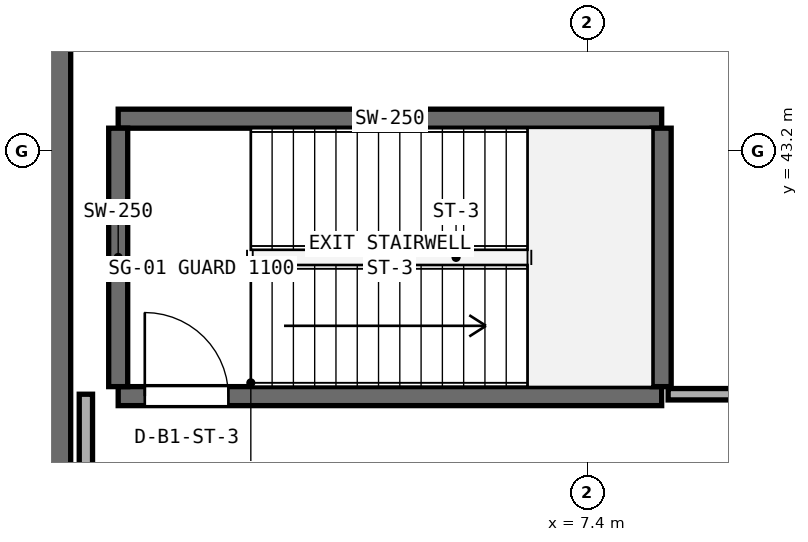
"""IFC4 building model, lengths in metres.
Left out: names, types, materials, properties, quantities, classifications, styles, units other than length and angle.
Written with IfcOpenShell. Run it as: python <this file> out.ifc"""

import sys

from ifc_helpers import new_model, si_unit, direction, frame, frame_2d, origin, place, context, subcontext, project, spatial, rectangle, extrude, element, fill, save


model = new_model("IFC4")
c1 = context("Model", 3, precision=1e-05, world=origin(), true_north=direction((0.0, 1.0)))
c2 = subcontext(c1, "Body", "Model", "MODEL_VIEW")
j1 = project(units=[si_unit("LENGTHUNIT", "METRE"), si_unit("PLANEANGLEUNIT", "RADIAN")], contexts=[c1])
p1 = place(None, origin())
s1 = spatial("IfcSite", under=j1, at=p1, CompositionType="ELEMENT")
p2 = place(p1, origin())
s2 = spatial("IfcBuilding", under=s1, at=p2, CompositionType="ELEMENT")
p3 = place(p2, frame((0.0, 0.0, -4.8)))
s3 = spatial("IfcBuildingStorey", under=s2, at=p3, CompositionType="ELEMENT", Elevation=-4.8)
p4 = place(p3, frame((0.3, 0.6, 0.0), z_axis=(0.0, 0.0, 1.0), x_axis=(0.0, 1.0, 0.0)))
e1 = element("IfcWall", 1, at=p4, inside=s3, PredefinedType="SOLIDWALL", context=c2, shape_type="SweptSolid", body=[
    extrude(rectangle(XDim=49.2, YDim=0.6, at=frame_2d((24.6, 0.0))), origin(), (0.0, 0.0, 1.0), 4.45),
])
p5 = place(p3, frame((1.225, 39.975, 0.0), z_axis=(0.0, 0.0, 1.0), x_axis=(1.0, 0.0, 0.0)))
e2 = element("IfcWall", 2, at=p5, inside=s3, PredefinedType="SHEAR", context=c2, shape_type="SweptSolid", body=[
    extrude(rectangle(XDim=7.15, YDim=0.25, at=frame_2d((3.575, 0.0))), origin(), (0.0, 0.0, 1.0), 4.45),
])
p6 = place(p5, frame((0.35, 0.0, 0.0)))
e3 = element("IfcOpeningElement", 3, at=p6, cuts=e2, PredefinedType="OPENING", context=c2, shape_type="SweptSolid", body=[
    extrude(rectangle(XDim=1.1, YDim=2.15, at=frame_2d((0.55, 1.075))), frame((0.0, 0.135, 0.0), z_axis=(0.0, -1.0, 0.0), x_axis=(1.0, 0.0, 0.0)), (0.0, 0.0, 1.0), 0.27),
])
p7 = place(p3, frame((1.225, 43.625, 0.0), z_axis=(0.0, 0.0, 1.0), x_axis=(1.0, 0.0, 0.0)))
e4 = element("IfcWall", 4, at=p7, inside=s3, PredefinedType="SHEAR", context=c2, shape_type="SweptSolid", body=[
    extrude(rectangle(XDim=7.15, YDim=0.25, at=frame_2d((3.575, 0.0))), origin(), (0.0, 0.0, 1.0), 4.45),
])
for number, where, z_axis, x_axis in (
    (5, (1.225, 40.1, 0.0), (0.0, 0.0, 1.0), (0.0, 1.0, 0.0)),
    (6, (8.375, 40.1, 0.0), (0.0, 0.0, 1.0), (0.0, 1.0, 0.0)),
):
    element("IfcWall", number, at=place(p3, frame(where, z_axis=z_axis, x_axis=x_axis)), inside=s3, PredefinedType="SHEAR", context=c2, shape_type="SweptSolid", body=[
        extrude(rectangle(XDim=3.4, YDim=0.25, at=frame_2d((1.7, 0.0))), origin(), (0.0, 0.0, 1.0), 4.45),
    ])
p8 = place(p3, frame((0.8, 37.5, 0.0), z_axis=(0.0, 0.0, 1.0), x_axis=(0.0, 1.0, 0.0)))
e7 = element("IfcWall", 7, at=p8, inside=s3, PredefinedType="PARTITIONING", context=c2, shape_type="SweptSolid", body=[
    extrude(rectangle(XDim=2.5, YDim=0.175, at=frame_2d((1.25, 0.0))), origin(), (0.0, 0.0, 1.0), 4.45),
])
p9 = place(p3, frame((8.46, 40.0, 0.0), z_axis=(0.0, 0.0, 1.0), x_axis=(1.0, 0.0, 0.0)))
e8 = element("IfcWall", 8, at=p9, inside=s3, PredefinedType="PARTITIONING", context=c2, shape_type="SweptSolid", body=[
    extrude(rectangle(XDim=57.68, YDim=0.15, at=frame_2d((28.84, 0.0))), origin(), (0.0, 0.0, 1.0), 4.45),
])
p10 = place(p9, frame((28.09, 0.0, 0.0)))
e9 = element("IfcOpeningElement", 9, at=p10, cuts=e8, PredefinedType="OPENING", context=c2, shape_type="SweptSolid", body=[
    extrude(rectangle(XDim=1.5, YDim=2.15, at=frame_2d((0.75, 1.075))), frame((0.0, 0.085, 0.0), z_axis=(0.0, -1.0, 0.0), x_axis=(1.0, 0.0, 0.0)), (0.0, 0.0, 1.0), 0.17),
])
p11 = place(p6, origin())
e10 = element("IfcDoor", 10, at=p11, inside=s3, OperationType="SINGLE_SWING_LEFT", PredefinedType="DOOR", context=c2, shape_type="SweptSolid", body=[
    extrude(rectangle(XDim=1.1, YDim=2.15, at=frame_2d((0.55, 1.075))), frame((0.0, 0.025, 0.0), z_axis=(0.0, -1.0, 0.0), x_axis=(1.0, 0.0, 0.0)), (0.0, 0.0, 1.0), 0.05),
])
fill(e3, e10)
save(model, sys.argv[1])
